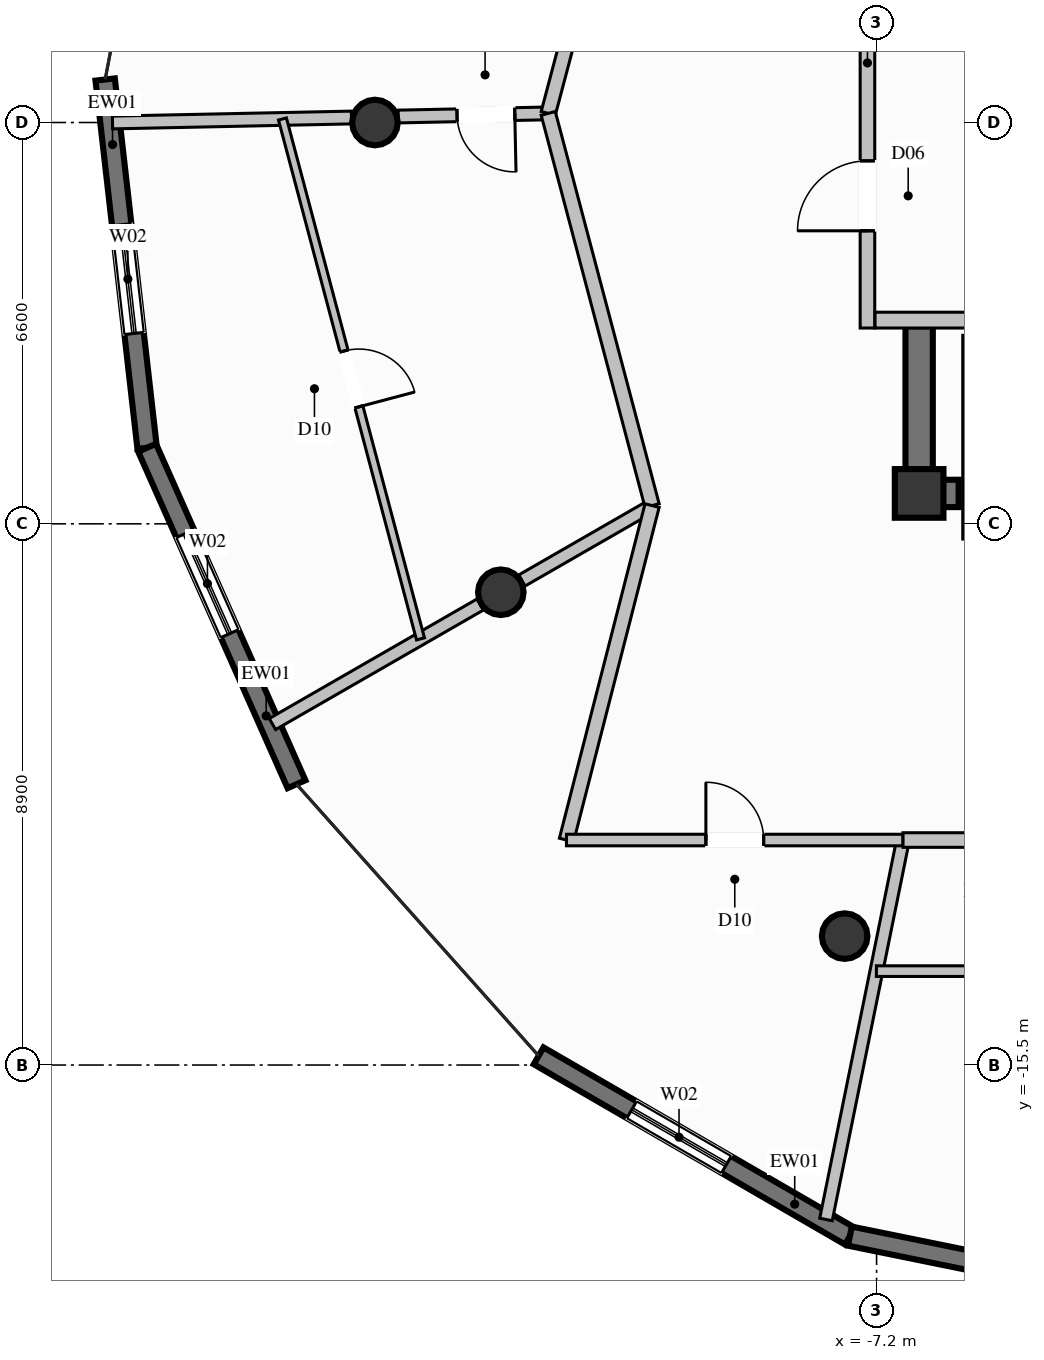
"""IFC4 building model, lengths in metres.
Left out: names, types, materials, properties, quantities, classifications, styles, units other than length and angle.
Written with IfcOpenShell. Run it as: python <this file> out.ifc"""

import sys

from ifc_helpers import new_model, si_unit, direction, frame, frame_2d, origin, origin_2d, place, context, subcontext, project, spatial, rectangle, circle, extrude, element, fill, save


model = new_model("IFC4")
c1 = context("Model", 3, precision=1e-05, world=origin(), true_north=direction((0.0, 1.0)))
c2 = subcontext(c1, "Body", "Model", "MODEL_VIEW")
j1 = project(units=[si_unit("LENGTHUNIT", "METRE"), si_unit("PLANEANGLEUNIT", "RADIAN")], contexts=[c1])
p1 = place(None, origin())
s1 = spatial("IfcSite", under=j1, at=p1, CompositionType="ELEMENT")
p2 = place(p1, origin())
s2 = spatial("IfcBuilding", under=s1, at=p2, CompositionType="ELEMENT")
p3 = place(p2, frame((0.0, 0.0, 285.8)))
s3 = spatial("IfcBuildingStorey", under=s2, at=p3, CompositionType="ELEMENT", Elevation=285.8)
p4 = place(p3, frame((-6.5, -6.1, 0.0), z_axis=(0.0, 0.0, 1.0), x_axis=(1.0, 0.0, 0.0)))
e1 = element("IfcColumn", 1, at=p4, inside=s3, PredefinedType="COLUMN", context=c2, shape_type="SweptSolid", body=[
    extrude(rectangle(XDim=0.8, YDim=0.8, at=origin_2d()), origin(), (0.0, 0.0, 1.0), 3.8),
])
p5 = place(p3, frame((-6.275, -6.1, 0.0), z_axis=(0.0, 0.0, 1.0), x_axis=(1.0, 0.0, 0.0)))
e2 = element("IfcWall", 2, at=p5, inside=s3, PredefinedType="SHEAR", context=c2, shape_type="SweptSolid", body=[
    extrude(rectangle(XDim=0.425, YDim=0.45, at=frame_2d((0.212, 0.0))), origin(), (0.0, 0.0, 1.0), 3.8),
])
p6 = place(p3, frame((-6.5, -6.325, 0.0), z_axis=(0.0, 0.0, 1.0), x_axis=(0.0, 1.0, 0.0)))
e3 = element("IfcWall", 3, at=p6, inside=s3, PredefinedType="SHEAR", context=c2, shape_type="SweptSolid", body=[
    extrude(rectangle(XDim=2.975, YDim=0.45, at=frame_2d((1.487, 0.0))), origin(), (0.0, 0.0, 1.0), 3.8),
])
for number, where, z_axis, x_axis in (
    (4, (-15.45, 0.0, 0.0), (0.0, 0.0, 1.0), (1.0, 0.0, 0.0)),
    (5, (-13.38, -7.725, 0.0), (0.0, 0.0, 1.0), (1.0, 0.0, 0.0)),
    (6, (-7.725, -13.38, 0.0), (0.0, 0.0, 1.0), (1.0, 0.0, 0.0)),
):
    element("IfcColumn", number, at=place(p3, frame(where, z_axis=z_axis, x_axis=x_axis)), inside=s3, PredefinedType="COLUMN", context=c2, shape_type="SweptSolid", body=[
        extrude(circle(Radius=0.375, at=origin_2d()), origin(), (0.0, 0.0, 1.0), 3.8),
    ])
p7 = place(p3, frame((-19.197, -5.349, 0.0), z_axis=(0.0, 0.0, 1.0), x_axis=(-0.113191877531, 0.993573147212, 0.0)))
e7 = element("IfcWall", 7, at=p7, inside=s3, PredefinedType="SOLIDWALL", context=c2, shape_type="SweptSolid", body=[
    extrude(rectangle(XDim=6.095, YDim=0.32, at=frame_2d((3.048, 0.0))), origin(), (0.0, 0.0, 1.0), 3.57),
])
p8 = place(p7, frame((1.892, 0.0, 0.35)))
e8 = element("IfcOpeningElement", 8, at=p8, cuts=e7, PredefinedType="OPENING", context=c2, shape_type="SweptSolid", body=[
    extrude(rectangle(XDim=1.8, YDim=2.6, at=frame_2d((0.9, 1.3))), frame((0.0, 0.17, 0.0), z_axis=(0.0, -1.0, 0.0), x_axis=(1.0, 0.0, 0.0)), (0.0, 0.0, 1.0), 0.34),
])
p9 = place(p3, frame((-16.74, -10.882, 0.0), z_axis=(0.0, 0.0, 1.0), x_axis=(-0.405854076471, 0.913937891004, 0.0)))
e9 = element("IfcWall", 9, at=p9, inside=s3, PredefinedType="SOLIDWALL", context=c2, shape_type="SweptSolid", body=[
    extrude(rectangle(XDim=6.054, YDim=0.32, at=frame_2d((3.027, 0.0))), origin(), (0.0, 0.0, 1.0), 3.57),
])
p10 = place(p9, frame((2.709, 0.0, 0.35)))
e10 = element("IfcOpeningElement", 10, at=p10, cuts=e9, PredefinedType="OPENING", context=c2, shape_type="SweptSolid", body=[
    extrude(rectangle(XDim=1.8, YDim=2.6, at=frame_2d((0.9, 1.3))), frame((0.0, 0.17, 0.0), z_axis=(0.0, -1.0, 0.0), x_axis=(1.0, 0.0, 0.0)), (0.0, 0.0, 1.0), 0.34),
])
p11 = place(p3, frame((-7.639, -18.314, 0.0), z_axis=(0.0, 0.0, 1.0), x_axis=(-0.865343391722, 0.501179423363, 0.0)))
e11 = element("IfcWall", 11, at=p11, inside=s3, PredefinedType="SOLIDWALL", context=c2, shape_type="SweptSolid", body=[
    extrude(rectangle(XDim=5.916, YDim=0.32, at=frame_2d((2.958, 0.0))), origin(), (0.0, 0.0, 1.0), 3.57),
])
p12 = place(p11, frame((2.347, 0.0, 0.35)))
e12 = element("IfcOpeningElement", 12, at=p12, cuts=e11, PredefinedType="OPENING", context=c2, shape_type="SweptSolid", body=[
    extrude(rectangle(XDim=1.8, YDim=2.6, at=frame_2d((0.9, 1.3))), frame((0.0, 0.17, 0.0), z_axis=(0.0, -1.0, 0.0), x_axis=(1.0, 0.0, 0.0)), (0.0, 0.0, 1.0), 0.34),
])
p13 = place(p3, frame((-1.885, -19.486, 0.0), z_axis=(0.0, 0.0, 1.0), x_axis=(-0.979875645158, 0.199608917702, 0.0)))
e13 = element("IfcWall", 13, at=p13, inside=s3, PredefinedType="SOLIDWALL", context=c2, shape_type="SweptSolid", body=[
    extrude(rectangle(XDim=5.872, YDim=0.32, at=frame_2d((2.936, 0.0))), origin(), (0.0, 0.0, 1.0), 3.57),
])
p14 = place(p13, frame((2.036, 0.0, 0.35)))
e14 = element("IfcOpeningElement", 14, at=p14, cuts=e13, PredefinedType="OPENING", context=c2, shape_type="SweptSolid", body=[
    extrude(rectangle(XDim=1.8, YDim=2.6, at=frame_2d((0.9, 1.3))), frame((0.0, 0.17, 0.0), z_axis=(0.0, -1.0, 0.0), x_axis=(1.0, 0.0, 0.0)), (0.0, 0.0, 1.0), 0.34),
])
p15 = place(p3, frame((-7.35, -3.38, 0.0), z_axis=(0.0, 0.0, 1.0), x_axis=(0.0, 1.0, 0.0)))
e15 = element("IfcWall", 15, at=p15, inside=s3, PredefinedType="PARTITIONING", context=c2, shape_type="SweptSolid", body=[
    extrude(rectangle(XDim=5.72, YDim=0.24, at=frame_2d((2.86, 0.0))), origin(), (0.0, 0.0, 1.0), 2.655),
])
p16 = place(p15, frame((1.599, 0.0, 0.0)))
e16 = element("IfcOpeningElement", 16, at=p16, cuts=e15, PredefinedType="OPENING", context=c2, shape_type="SweptSolid", body=[
    extrude(rectangle(XDim=1.15, YDim=2.2, at=frame_2d((0.575, 1.1))), frame((0.0, 0.13, 0.0), z_axis=(0.0, -1.0, 0.0), x_axis=(1.0, 0.0, 0.0)), (0.0, 0.0, 1.0), 0.26),
])
p17 = place(p3, frame((-7.225, -3.25, 0.0), z_axis=(0.0, 0.0, 1.0), x_axis=(1.0, 0.0, 0.0)))
e17 = element("IfcWall", 17, at=p17, inside=s3, PredefinedType="PARTITIONING", context=c2, shape_type="SweptSolid", body=[
    extrude(rectangle(XDim=3.095, YDim=0.26, at=frame_2d((1.548, 0.0))), origin(), (0.0, 0.0, 1.0), 3.57),
])
p18 = place(p3, frame((-5.7, -3.5, 0.0), z_axis=(0.0, 0.0, 1.0), x_axis=(0.0, -1.0, 0.0)))
e18 = element("IfcWall", 18, at=p18, inside=s3, PredefinedType="PARTITIONING", context=c2, shape_type="SweptSolid", body=[
    extrude(rectangle(XDim=3.35, YDim=0.165, at=frame_2d((1.675, 0.0))), origin(), (0.0, 0.0, 1.0), 2.655),
])
p19 = place(p3, frame((-12.6, 0.15, 0.0), z_axis=(0.0, 0.0, 1.0), x_axis=(-0.999777874808, -0.021076077527, 0.0)))
e19 = element("IfcWall", 19, at=p19, inside=s3, PredefinedType="PARTITIONING", context=c2, shape_type="SweptSolid", body=[
    extrude(rectangle(XDim=2.467, YDim=0.21, at=frame_2d((1.234, 0.0))), origin(), (0.0, 0.0, 1.0), 3.57),
])
p20 = place(p19, frame((0.55, 0.0, 0.0)))
e20 = element("IfcOpeningElement", 20, at=p20, cuts=e19, PredefinedType="OPENING", context=c2, shape_type="SweptSolid", body=[
    extrude(rectangle(XDim=0.95, YDim=2.1, at=frame_2d((0.475, 1.05))), frame((0.0, 0.115, 0.0), z_axis=(0.0, -1.0, 0.0), x_axis=(1.0, 0.0, 0.0)), (0.0, 0.0, 1.0), 0.23),
])
p21 = place(p3, frame((-15.836, 0.082, 0.0), z_axis=(0.0, 0.0, 1.0), x_axis=(-0.999782247654, -0.020867613071, 0.0)))
e21 = element("IfcWall", 21, at=p21, inside=s3, PredefinedType="PARTITIONING", context=c2, shape_type="SweptSolid", body=[
    extrude(rectangle(XDim=3.931, YDim=0.21, at=frame_2d((1.966, 0.0))), origin(), (0.0, 0.0, 1.0), 3.57),
])
p22 = place(p3, frame((-10.892, -6.3, 0.0), z_axis=(0.0, 0.0, 1.0), x_axis=(-0.866768644494, -0.498710453993, 0.0)))
e22 = element("IfcWall", 22, at=p22, inside=s3, PredefinedType="PARTITIONING", context=c2, shape_type="SweptSolid", body=[
    extrude(rectangle(XDim=2.472, YDim=0.21, at=frame_2d((1.236, 0.0))), origin(), (0.0, 0.0, 1.0), 3.011),
])
p23 = place(p3, frame((-13.719, -7.927, 0.0), z_axis=(0.0, 0.0, 1.0), x_axis=(-0.866764432385, -0.49871777465, 0.0)))
e23 = element("IfcWall", 23, at=p23, inside=s3, PredefinedType="PARTITIONING", context=c2, shape_type="SweptSolid", body=[
    extrude(rectangle(XDim=3.942, YDim=0.21, at=frame_2d((1.971, 0.0))), origin(), (0.0, 0.0, 1.0), 3.57),
])
p24 = place(p3, frame((-10.892, 6.6, 0.0), z_axis=(0.0, 0.0, 1.0), x_axis=(-0.255977036578, -0.966682862548, 0.0)))
e24 = element("IfcWall", 24, at=p24, inside=s3, PredefinedType="PARTITIONING", context=c2, shape_type="SweptSolid", body=[
    extrude(rectangle(XDim=6.673, YDim=0.24, at=frame_2d((3.336, 0.0))), origin(), (0.0, 0.0, 1.0), 3.57),
])
p25 = place(p3, frame((-12.6, 0.15, 0.0), z_axis=(0.0, 0.0, 1.0), x_axis=(0.255986090798, -0.966680464951, 0.0)))
e25 = element("IfcWall", 25, at=p25, inside=s3, PredefinedType="PARTITIONING", context=c2, shape_type="SweptSolid", body=[
    extrude(rectangle(XDim=6.672, YDim=0.24, at=frame_2d((3.336, 0.0))), origin(), (0.0, 0.0, 1.0), 3.57),
])
p26 = place(p3, frame((-16.971, 0.058, 0.0), z_axis=(0.0, 0.0, 1.0), x_axis=(0.2566078117, -0.966515613415, 0.0)))
e26 = element("IfcWall", 26, at=p26, inside=s3, PredefinedType="PARTITIONING", context=c2, shape_type="SweptSolid", body=[
    extrude(rectangle(XDim=8.846, YDim=0.135, at=frame_2d((4.423, 0.0))), origin(), (0.0, 0.0, 1.0), 3.57),
])
p27 = place(p26, frame((3.948, 0.0, 0.0)))
e27 = element("IfcOpeningElement", 27, at=p27, cuts=e26, PredefinedType="OPENING", context=c2, shape_type="SweptSolid", body=[
    extrude(rectangle(XDim=0.95, YDim=2.1, at=frame_2d((0.475, 1.05))), frame((0.0, 0.078, 0.0), z_axis=(0.0, -1.0, 0.0), x_axis=(1.0, 0.0, 0.0)), (0.0, 0.0, 1.0), 0.155),
])
p28 = place(p3, frame((-6.765, -11.8, 0.0), z_axis=(0.0, 0.0, 1.0), x_axis=(-0.198998359894, -0.979999822837, 0.0)))
e28 = element("IfcWall", 28, at=p28, inside=s3, PredefinedType="PARTITIONING", context=c2, shape_type="SweptSolid", body=[
    extrude(rectangle(XDim=6.367, YDim=0.21, at=frame_2d((3.184, 0.0))), origin(), (0.0, 0.0, 1.0), 3.011),
])
p29 = place(p3, frame((-10.892, -6.3, 0.0), z_axis=(0.0, 0.0, 1.0), x_axis=(-0.247995630193, -0.968761150855, 0.0)))
e29 = element("IfcWall", 29, at=p29, inside=s3, PredefinedType="PARTITIONING", context=c2, shape_type="SweptSolid", body=[
    extrude(rectangle(XDim=5.677, YDim=0.24, at=frame_2d((2.839, 0.0))), origin(), (0.0, 0.0, 1.0), 3.57),
])
p30 = place(p3, frame((-12.3, -11.8, 0.0), z_axis=(0.0, 0.0, 1.0), x_axis=(1.0, 0.0, 0.0)))
e30 = element("IfcWall", 30, at=p30, inside=s3, PredefinedType="PARTITIONING", context=c2, shape_type="SweptSolid", body=[
    extrude(rectangle(XDim=5.535, YDim=0.19, at=frame_2d((2.768, 0.0))), origin(), (0.0, 0.0, 1.0), 3.57),
])
p31 = place(p30, frame((2.293, 0.0, 0.0)))
e31 = element("IfcOpeningElement", 31, at=p31, cuts=e30, PredefinedType="OPENING", context=c2, shape_type="SweptSolid", body=[
    extrude(rectangle(XDim=0.95, YDim=2.1, at=frame_2d((0.475, 1.05))), frame((0.0, 0.105, 0.0), z_axis=(0.0, -1.0, 0.0), x_axis=(1.0, 0.0, 0.0)), (0.0, 0.0, 1.0), 0.21),
])
p32 = place(p3, frame((-6.765, -11.8, 0.0), z_axis=(0.0, 0.0, 1.0), x_axis=(1.0, 0.0, 0.0)))
e32 = element("IfcWall", 32, at=p32, inside=s3, PredefinedType="PARTITIONING", context=c2, shape_type="SweptSolid", body=[
    extrude(rectangle(XDim=6.765, YDim=0.24, at=frame_2d((3.382, 0.0))), origin(), (0.0, 0.0, 1.0), 3.57),
])
p33 = place(p3, frame((-7.203, -13.956, 0.0), z_axis=(0.0, 0.0, 1.0), x_axis=(1.0, 0.0, 0.0)))
e33 = element("IfcWall", 33, at=p33, inside=s3, PredefinedType="PLUMBINGWALL", context=c2, shape_type="SweptSolid", body=[
    extrude(rectangle(XDim=7.203, YDim=0.175, at=frame_2d((3.602, 0.0))), origin(), (0.0, 0.0, 1.0), 3.137),
])
p34 = place(p8, origin())
e34 = element("IfcWindow", 34, at=p34, inside=s3, PartitioningType="SINGLE_PANEL", PredefinedType="WINDOW", context=c2, shape_type="SweptSolid", body=[
    extrude(rectangle(XDim=1.8, YDim=2.6, at=frame_2d((0.9, 1.3))), frame((0.0, 0.03, 0.0), z_axis=(0.0, -1.0, 0.0), x_axis=(1.0, 0.0, 0.0)), (0.0, 0.0, 1.0), 0.06),
])
fill(e8, e34)
p35 = place(p10, origin())
e35 = element("IfcWindow", 35, at=p35, inside=s3, PartitioningType="SINGLE_PANEL", PredefinedType="WINDOW", context=c2, shape_type="SweptSolid", body=[
    extrude(rectangle(XDim=1.8, YDim=2.6, at=frame_2d((0.9, 1.3))), frame((0.0, 0.03, 0.0), z_axis=(0.0, -1.0, 0.0), x_axis=(1.0, 0.0, 0.0)), (0.0, 0.0, 1.0), 0.06),
])
fill(e10, e35)
p36 = place(p12, origin())
e36 = element("IfcWindow", 36, at=p36, inside=s3, PartitioningType="SINGLE_PANEL", PredefinedType="WINDOW", context=c2, shape_type="SweptSolid", body=[
    extrude(rectangle(XDim=1.8, YDim=2.6, at=frame_2d((0.9, 1.3))), frame((0.0, 0.03, 0.0), z_axis=(0.0, -1.0, 0.0), x_axis=(1.0, 0.0, 0.0)), (0.0, 0.0, 1.0), 0.06),
])
fill(e12, e36)
p37 = place(p16, origin())
e37 = element("IfcDoor", 37, at=p37, inside=s3, OperationType="SINGLE_SWING_LEFT", PredefinedType="DOOR", context=c2, shape_type="SweptSolid", body=[
    extrude(rectangle(XDim=1.15, YDim=2.2, at=frame_2d((0.575, 1.1))), frame((0.0, 0.025, 0.0), z_axis=(0.0, -1.0, 0.0), x_axis=(1.0, 0.0, 0.0)), (0.0, 0.0, 1.0), 0.05),
])
fill(e16, e37)
p38 = place(p20, origin())
e38 = element("IfcDoor", 38, at=p38, inside=s3, OperationType="SINGLE_SWING_LEFT", PredefinedType="DOOR", context=c2, shape_type="SweptSolid", body=[
    extrude(rectangle(XDim=0.95, YDim=2.1, at=frame_2d((0.475, 1.05))), frame((0.0, 0.025, 0.0), z_axis=(0.0, -1.0, 0.0), x_axis=(1.0, 0.0, 0.0)), (0.0, 0.0, 1.0), 0.05),
])
fill(e20, e38)
p39 = place(p27, origin())
e39 = element("IfcDoor", 39, at=p39, inside=s3, OperationType="SINGLE_SWING_RIGHT", PredefinedType="DOOR", context=c2, shape_type="SweptSolid", body=[
    extrude(rectangle(XDim=0.95, YDim=2.1, at=frame_2d((0.475, 1.05))), frame((0.0, 0.025, 0.0), z_axis=(0.0, -1.0, 0.0), x_axis=(1.0, 0.0, 0.0)), (0.0, 0.0, 1.0), 0.05),
])
fill(e27, e39)
p40 = place(p31, origin())
e40 = element("IfcDoor", 40, at=p40, inside=s3, OperationType="SINGLE_SWING_LEFT", PredefinedType="DOOR", context=c2, shape_type="SweptSolid", body=[
    extrude(rectangle(XDim=0.95, YDim=2.1, at=frame_2d((0.475, 1.05))), frame((0.0, 0.025, 0.0), z_axis=(0.0, -1.0, 0.0), x_axis=(1.0, 0.0, 0.0)), (0.0, 0.0, 1.0), 0.05),
])
fill(e31, e40)
save(model, sys.argv[1])
